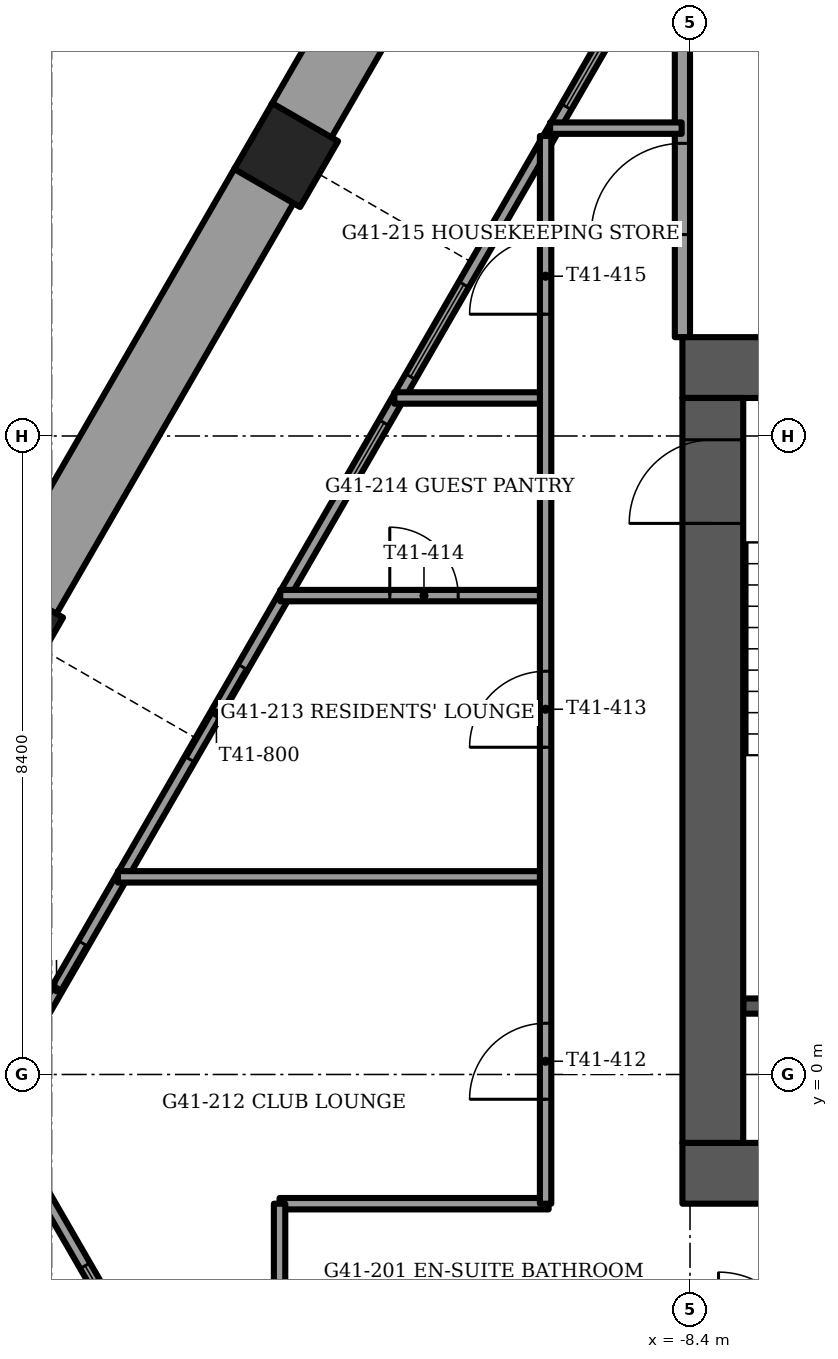
"""IFC4 building model, lengths in metres.
Left out: names, types, materials, properties, quantities, classifications, styles, units other than length and angle.
Written with IfcOpenShell. Run it as: python <this file> out.ifc"""

import sys

from ifc_helpers import new_model, si_unit, direction, frame, frame_2d, origin, origin_2d, place, context, subcontext, project, spatial, rectangle, extrude, element, fill, save


model = new_model("IFC4")
c1 = context("Model", 3, precision=1e-05, world=origin(), true_north=direction((0.0, 1.0)))
c2 = subcontext(c1, "Body", "Model", "MODEL_VIEW")
j1 = project(units=[si_unit("LENGTHUNIT", "METRE"), si_unit("PLANEANGLEUNIT", "RADIAN")], contexts=[c1])
p1 = place(None, origin())
s1 = spatial("IfcSite", under=j1, at=p1, CompositionType="ELEMENT")
p2 = place(p1, origin())
s2 = spatial("IfcBuilding", under=s1, at=p2, CompositionType="ELEMENT")
p3 = place(p2, frame((0.0, 0.0, 168.25)))
s3 = spatial("IfcBuildingStorey", under=s2, at=p3, CompositionType="ELEMENT", Elevation=168.25)
for number, where, z_axis, x_axis in (
    (1, (-13.713, 12.095, -1.2), (0.0, 0.0, 1.0), (0.5, 0.866, 0.0)),
    (2, (-17.331, 5.829, -1.2), (0.0, 0.0, 1.0), (0.5, 0.866, 0.0)),
):
    element("IfcColumn", number, at=place(p3, frame(where, z_axis=z_axis, x_axis=x_axis)), inside=s3, PredefinedType="COLUMN", context=c2, shape_type="SweptSolid", body=[
        extrude(rectangle(XDim=1.0, YDim=1.0, at=origin_2d()), origin(), (0.0, 0.0, 1.0), 3.75),
    ])
p4 = place(p3, frame((-8.5, -1.3, -0.3), z_axis=(0.0, 0.0, 1.0), x_axis=(1.0, 0.0, 0.0)))
e3 = element("IfcWall", 3, at=p4, inside=s3, PredefinedType="SHEAR", context=c2, shape_type="SweptSolid", body=[
    extrude(rectangle(XDim=17.0, YDim=0.8, at=frame_2d((8.5, 0.0))), origin(), (0.0, 0.0, 1.0), 3.75),
])
p5 = place(p4, frame((7.7, 0.0, 0.0)))
e4 = element("IfcOpeningElement", 4, at=p5, cuts=e3, PredefinedType="OPENING", context=c2, shape_type="SweptSolid", body=[
    extrude(rectangle(XDim=1.6, YDim=2.1, at=frame_2d((0.8, 1.05))), frame((0.0, 0.4, 0.0), z_axis=(0.0, -1.0, 0.0), x_axis=(1.0, 0.0, 0.0)), (0.0, 0.0, 1.0), 0.8),
])
p6 = place(p3, frame((-8.5, 9.3, -0.3), z_axis=(0.0, 0.0, 1.0), x_axis=(1.0, 0.0, 0.0)))
e5 = element("IfcWall", 5, at=p6, inside=s3, PredefinedType="SHEAR", context=c2, shape_type="SweptSolid", body=[
    extrude(rectangle(XDim=17.0, YDim=0.8, at=frame_2d((8.5, 0.0))), origin(), (0.0, 0.0, 1.0), 3.75),
])
p7 = place(p6, frame((7.7, 0.0, 0.0)))
e6 = element("IfcOpeningElement", 6, at=p7, cuts=e5, PredefinedType="OPENING", context=c2, shape_type="SweptSolid", body=[
    extrude(rectangle(XDim=1.6, YDim=2.1, at=frame_2d((0.8, 1.05))), frame((0.0, 0.4, 0.0), z_axis=(0.0, -1.0, 0.0), x_axis=(1.0, 0.0, 0.0)), (0.0, 0.0, 1.0), 0.8),
])
p8 = place(p6, frame((1.75, 0.0, 0.0)))
e7 = element("IfcOpeningElement", 7, at=p8, cuts=e5, PredefinedType="OPENING", context=c2, shape_type="SweptSolid", body=[
    extrude(rectangle(XDim=1.1, YDim=2.1, at=frame_2d((0.55, 1.05))), frame((0.0, 0.4, 0.0), z_axis=(0.0, -1.0, 0.0), x_axis=(1.0, 0.0, 0.0)), (0.0, 0.0, 1.0), 0.8),
])
p9 = place(p6, frame((14.15, 0.0, 0.0)))
e8 = element("IfcOpeningElement", 8, at=p9, cuts=e5, PredefinedType="OPENING", context=c2, shape_type="SweptSolid", body=[
    extrude(rectangle(XDim=1.1, YDim=2.1, at=frame_2d((0.55, 1.05))), frame((0.0, 0.4, 0.0), z_axis=(0.0, -1.0, 0.0), x_axis=(1.0, 0.0, 0.0)), (0.0, 0.0, 1.0), 0.8),
])
p10 = place(p3, frame((-8.1, -0.9, -0.3), z_axis=(0.0, 0.0, 1.0), x_axis=(0.0, 1.0, 0.0)))
e9 = element("IfcWall", 9, at=p10, inside=s3, PredefinedType="SHEAR", context=c2, shape_type="SweptSolid", body=[
    extrude(rectangle(XDim=9.8, YDim=0.8, at=frame_2d((4.9, 0.0))), origin(), (0.0, 0.0, 1.0), 3.75),
])
p11 = place(p10, frame((8.15, 0.0, 0.0)))
e10 = element("IfcOpeningElement", 10, at=p11, cuts=e9, PredefinedType="OPENING", context=c2, shape_type="SweptSolid", body=[
    extrude(rectangle(XDim=1.1, YDim=2.1, at=frame_2d((0.55, 1.05))), frame((0.0, 0.4, 0.0), z_axis=(0.0, -1.0, 0.0), x_axis=(1.0, 0.0, 0.0)), (0.0, 0.0, 1.0), 0.8),
])
p12 = place(p3, frame((-10.431, 17.88, 0.0), z_axis=(0.0, 0.0, 1.0), x_axis=(-0.49998343065, -0.866034969892, 0.0)))
e11 = element("IfcWall", 11, at=p12, inside=s3, PredefinedType="PARAPET", context=c2, shape_type="SweptSolid", body=[
    extrude(rectangle(XDim=6.181, YDim=0.9, at=frame_2d((3.091, 0.0))), origin(), (0.0, 0.0, 1.0), 1.1),
])
p13 = place(p3, frame((-13.992, 11.713, 0.0), z_axis=(0.0, 0.0, 1.0), x_axis=(-0.499984268907, -0.866034485945, 0.0)))
e12 = element("IfcWall", 12, at=p13, inside=s3, PredefinedType="PARAPET", context=c2, shape_type="SweptSolid", body=[
    extrude(rectangle(XDim=6.296, YDim=0.9, at=frame_2d((3.148, 0.0))), origin(), (0.0, 0.0, 1.0), 1.1),
])
p14 = place(p3, frame((-7.393, 17.292, 0.0), z_axis=(0.0, 0.0, 1.0), x_axis=(-0.500001917853, -0.866024296509, 0.0)))
e13 = element("IfcWall", 13, at=p14, inside=s3, PredefinedType="SOLIDWALL", context=c2, shape_type="SweptSolid", body=[
    extrude(rectangle(XDim=19.788, YDim=0.15, at=frame_2d((9.894, 0.0))), origin(), (0.0, 0.0, 1.0), 3.45),
])
p15 = place(p14, frame((3.868, 0.0, 0.15)))
e14 = element("IfcOpeningElement", 14, at=p15, cuts=e13, PredefinedType="OPENING", context=c2, shape_type="SweptSolid", body=[
    extrude(rectangle(XDim=1.4, YDim=2.85, at=frame_2d((0.7, 1.425))), frame((0.0, 0.075, 0.0), z_axis=(0.0, -1.0, 0.0), x_axis=(1.0, 0.0, 0.0)), (0.0, 0.0, 1.0), 0.15),
])
p16 = place(p14, frame((10.067, 0.0, 0.15)))
e15 = element("IfcOpeningElement", 15, at=p16, cuts=e13, PredefinedType="OPENING", context=c2, shape_type="SweptSolid", body=[
    extrude(rectangle(XDim=0.9, YDim=2.85, at=frame_2d((0.45, 1.425))), frame((0.0, 0.075, 0.0), z_axis=(0.0, -1.0, 0.0), x_axis=(1.0, 0.0, 0.0)), (0.0, 0.0, 1.0), 0.15),
])
p17 = place(p14, frame((7.967, 0.0, 0.15)))
e16 = element("IfcOpeningElement", 16, at=p17, cuts=e13, PredefinedType="OPENING", context=c2, shape_type="SweptSolid", body=[
    extrude(rectangle(XDim=1.4, YDim=2.85, at=frame_2d((0.7, 1.425))), frame((0.0, 0.075, 0.0), z_axis=(0.0, -1.0, 0.0), x_axis=(1.0, 0.0, 0.0)), (0.0, 0.0, 1.0), 0.15),
])
p18 = place(p14, frame((13.779, 0.0, 0.0)))
e17 = element("IfcOpeningElement", 17, at=p18, cuts=e13, PredefinedType="OPENING", context=c2, shape_type="SweptSolid", body=[
    extrude(rectangle(XDim=1.4, YDim=2.4, at=frame_2d((0.7, 1.2))), frame((0.0, 0.075, 0.0), z_axis=(0.0, -1.0, 0.0), x_axis=(1.0, 0.0, 0.0)), (0.0, 0.0, 1.0), 0.15),
])
p19 = place(p14, frame((17.979, 0.0, 0.0)))
e18 = element("IfcOpeningElement", 18, at=p19, cuts=e13, PredefinedType="OPENING", context=c2, shape_type="SweptSolid", body=[
    extrude(rectangle(XDim=1.4, YDim=2.4, at=frame_2d((0.7, 1.2))), frame((0.0, 0.075, 0.0), z_axis=(0.0, -1.0, 0.0), x_axis=(1.0, 0.0, 0.0)), (0.0, 0.0, 1.0), 0.15),
])
p20 = place(p14, frame((0.168, 0.0, 0.15)))
e19 = element("IfcOpeningElement", 19, at=p20, cuts=e13, PredefinedType="OPENING", context=c2, shape_type="SweptSolid", body=[
    extrude(rectangle(XDim=1.6, YDim=2.73, at=frame_2d((0.8, 1.365))), frame((0.0, 0.075, 0.0), z_axis=(0.0, -1.0, 0.0), x_axis=(1.0, 0.0, 0.0)), (0.0, 0.0, 1.0), 0.15),
])
p21 = place(p3, frame((-17.287, -0.909, 0.0), z_axis=(0.0, 0.0, 1.0), x_axis=(0.500004460396, -0.866022828558, 0.0)))
e20 = element("IfcWall", 20, at=p21, inside=s3, PredefinedType="SOLIDWALL", context=c2, shape_type="SweptSolid", body=[
    extrude(rectangle(XDim=15.712, YDim=0.15, at=frame_2d((7.856, 0.0))), origin(), (0.0, 0.0, 1.0), 3.45),
])
p22 = place(p21, frame((1.856, 0.0, 0.15)))
e21 = element("IfcOpeningElement", 21, at=p22, cuts=e20, PredefinedType="OPENING", context=c2, shape_type="SweptSolid", body=[
    extrude(rectangle(XDim=0.9, YDim=2.85, at=frame_2d((0.45, 1.425))), frame((0.0, 0.075, 0.0), z_axis=(0.0, -1.0, 0.0), x_axis=(1.0, 0.0, 0.0)), (0.0, 0.0, 1.0), 0.15),
])
p23 = place(p21, frame((4.056, 0.0, 0.15)))
e22 = element("IfcOpeningElement", 22, at=p23, cuts=e20, PredefinedType="OPENING", context=c2, shape_type="SweptSolid", body=[
    extrude(rectangle(XDim=1.4, YDim=2.85, at=frame_2d((0.7, 1.425))), frame((0.0, 0.075, 0.0), z_axis=(0.0, -1.0, 0.0), x_axis=(1.0, 0.0, 0.0)), (0.0, 0.0, 1.0), 0.15),
])
p24 = place(p21, frame((6.549, 0.0, 0.15)))
e23 = element("IfcOpeningElement", 23, at=p24, cuts=e20, PredefinedType="OPENING", context=c2, shape_type="SweptSolid", body=[
    extrude(rectangle(XDim=1.6, YDim=2.85, at=frame_2d((0.8, 1.425))), frame((0.0, 0.075, 0.0), z_axis=(0.0, -1.0, 0.0), x_axis=(1.0, 0.0, 0.0)), (0.0, 0.0, 1.0), 0.15),
])
p25 = place(p21, frame((8.256, 0.0, 0.0)))
e24 = element("IfcOpeningElement", 24, at=p25, cuts=e20, PredefinedType="OPENING", context=c2, shape_type="SweptSolid", body=[
    extrude(rectangle(XDim=1.4, YDim=2.4, at=frame_2d((0.7, 1.2))), frame((0.0, 0.075, 0.0), z_axis=(0.0, -1.0, 0.0), x_axis=(1.0, 0.0, 0.0)), (0.0, 0.0, 1.0), 0.15),
])
p26 = place(p21, frame((10.256, 0.0, 0.15)))
e25 = element("IfcOpeningElement", 25, at=p26, cuts=e20, PredefinedType="OPENING", context=c2, shape_type="SweptSolid", body=[
    extrude(rectangle(XDim=0.9, YDim=2.85, at=frame_2d((0.45, 1.425))), frame((0.0, 0.075, 0.0), z_axis=(0.0, -1.0, 0.0), x_axis=(1.0, 0.0, 0.0)), (0.0, 0.0, 1.0), 0.15),
])
p27 = place(p3, frame((-7.7, 0.9, -0.3), z_axis=(0.0, 0.0, 1.0), x_axis=(1.0, 0.0, 0.0)))
e26 = element("IfcWall", 26, at=p27, inside=s3, PredefinedType="SOLIDWALL", context=c2, shape_type="SweptSolid", body=[
    extrude(rectangle(XDim=3.25, YDim=0.2, at=frame_2d((1.625, 0.0))), origin(), (0.0, 0.0, 1.0), 3.75),
])
p28 = place(p3, frame((-8.5, 9.7, 0.0), z_axis=(0.0, 0.0, 1.0), x_axis=(0.0, 1.0, 0.0)))
e27 = element("IfcWall", 27, at=p28, inside=s3, PredefinedType="PARTITIONING", context=c2, shape_type="SweptSolid", body=[
    extrude(rectangle(XDim=3.9, YDim=0.2, at=frame_2d((1.95, 0.0))), origin(), (0.0, 0.0, 1.0), 3.45),
])
p29 = place(p28, frame((1.35, 0.0, 0.0)))
e28 = element("IfcOpeningElement", 28, at=p29, cuts=e27, PredefinedType="OPENING", context=c2, shape_type="SweptSolid", body=[
    extrude(rectangle(XDim=1.2, YDim=2.1, at=frame_2d((0.6, 1.05))), frame((0.0, 0.1, 0.0), z_axis=(0.0, -1.0, 0.0), x_axis=(1.0, 0.0, 0.0)), (0.0, 0.0, 1.0), 0.2),
])
p30 = place(p3, frame((-13.8, -1.7, 0.0), z_axis=(0.0, 0.0, 1.0), x_axis=(1.0, 0.0, 0.0)))
e29 = element("IfcWall", 29, at=p30, inside=s3, PredefinedType="PARTITIONING", context=c2, shape_type="SweptSolid", body=[
    extrude(rectangle(XDim=3.54, YDim=0.15, at=frame_2d((1.77, 0.0))), origin(), (0.0, 0.0, 1.0), 3.45),
])
p31 = place(p3, frame((-15.927, 2.6, 0.0), z_axis=(0.0, 0.0, 1.0), x_axis=(1.0, 0.0, 0.0)))
e30 = element("IfcWall", 30, at=p31, inside=s3, PredefinedType="PARTITIONING", context=c2, shape_type="SweptSolid", body=[
    extrude(rectangle(XDim=5.627, YDim=0.15, at=frame_2d((2.813, 0.0))), origin(), (0.0, 0.0, 1.0), 3.45),
])
p32 = place(p3, frame((-13.791, 6.3, 0.0), z_axis=(0.0, 0.0, 1.0), x_axis=(1.0, 0.0, 0.0)))
e31 = element("IfcWall", 31, at=p32, inside=s3, PredefinedType="PARTITIONING", context=c2, shape_type="SweptSolid", body=[
    extrude(rectangle(XDim=3.491, YDim=0.15, at=frame_2d((1.746, 0.0))), origin(), (0.0, 0.0, 1.0), 3.45),
])
p33 = place(p32, frame((1.441, 0.0, 0.0)))
e32 = element("IfcOpeningElement", 32, at=p33, cuts=e31, PredefinedType="OPENING", context=c2, shape_type="SweptSolid", body=[
    extrude(rectangle(XDim=0.9, YDim=2.1, at=frame_2d((0.45, 1.05))), frame((0.0, 0.075, 0.0), z_axis=(0.0, -1.0, 0.0), x_axis=(1.0, 0.0, 0.0)), (0.0, 0.0, 1.0), 0.15),
])
p34 = place(p3, frame((-12.29, 8.9, 0.0), z_axis=(0.0, 0.0, 1.0), x_axis=(1.0, 0.0, 0.0)))
e33 = element("IfcWall", 33, at=p34, inside=s3, PredefinedType="PARTITIONING", context=c2, shape_type="SweptSolid", body=[
    extrude(rectangle(XDim=1.99, YDim=0.15, at=frame_2d((0.995, 0.0))), origin(), (0.0, 0.0, 1.0), 3.45),
])
p35 = place(p3, frame((-10.241, 12.45, 0.0), z_axis=(0.0, 0.0, 1.0), x_axis=(1.0, 0.0, 0.0)))
e34 = element("IfcWall", 34, at=p35, inside=s3, PredefinedType="PARTITIONING", context=c2, shape_type="SweptSolid", body=[
    extrude(rectangle(XDim=1.731, YDim=0.15, at=frame_2d((0.865, 0.0))), origin(), (0.0, 0.0, 1.0), 3.45),
])
p36 = place(p3, frame((-10.3, -1.7, 0.0), z_axis=(0.0, 0.0, 1.0), x_axis=(0.0, 1.0, 0.0)))
e35 = element("IfcWall", 35, at=p36, inside=s3, PredefinedType="PARTITIONING", context=c2, shape_type="SweptSolid", body=[
    extrude(rectangle(XDim=14.047, YDim=0.15, at=frame_2d((7.023, 0.0))), origin(), (0.0, 0.0, 1.0), 3.45),
])
p37 = place(p36, frame((1.374, 0.0, 0.0)))
e36 = element("IfcOpeningElement", 36, at=p37, cuts=e35, PredefinedType="OPENING", context=c2, shape_type="SweptSolid", body=[
    extrude(rectangle(XDim=1.0, YDim=2.1, at=frame_2d((0.5, 1.05))), frame((0.0, 0.075, 0.0), z_axis=(0.0, -1.0, 0.0), x_axis=(1.0, 0.0, 0.0)), (0.0, 0.0, 1.0), 0.15),
])
p38 = place(p36, frame((6.005, 0.0, 0.0)))
e37 = element("IfcOpeningElement", 37, at=p38, cuts=e35, PredefinedType="OPENING", context=c2, shape_type="SweptSolid", body=[
    extrude(rectangle(XDim=1.0, YDim=2.1, at=frame_2d((0.5, 1.05))), frame((0.0, 0.075, 0.0), z_axis=(0.0, -1.0, 0.0), x_axis=(1.0, 0.0, 0.0)), (0.0, 0.0, 1.0), 0.15),
])
p39 = place(p36, frame((11.702, 0.0, 0.0)))
e38 = element("IfcOpeningElement", 38, at=p39, cuts=e35, PredefinedType="OPENING", context=c2, shape_type="SweptSolid", body=[
    extrude(rectangle(XDim=1.0, YDim=2.1, at=frame_2d((0.5, 1.05))), frame((0.0, 0.075, 0.0), z_axis=(0.0, -1.0, 0.0), x_axis=(1.0, 0.0, 0.0)), (0.0, 0.0, 1.0), 0.15),
])
p40 = place(p3, frame((-13.8, -3.7, 0.0), z_axis=(0.0, 0.0, 1.0), x_axis=(0.0, 1.0, 0.0)))
e39 = element("IfcWall", 39, at=p40, inside=s3, PredefinedType="PARTITIONING", context=c2, shape_type="SweptSolid", body=[
    extrude(rectangle(XDim=2.0, YDim=0.15, at=frame_2d((1.0, 0.0))), origin(), (0.0, 0.0, 1.0), 3.45),
])
p41 = place(p15, origin())
e40 = element("IfcWindow", 40, at=p41, inside=s3, PartitioningType="SINGLE_PANEL", PredefinedType="WINDOW", context=c2, shape_type="SweptSolid", body=[
    extrude(rectangle(XDim=1.4, YDim=2.85, at=frame_2d((0.7, 1.425))), frame((0.0, 0.03, 0.0), z_axis=(0.0, -1.0, 0.0), x_axis=(1.0, 0.0, 0.0)), (0.0, 0.0, 1.0), 0.06),
])
fill(e14, e40)
p42 = place(p16, origin())
e41 = element("IfcWindow", 41, at=p42, inside=s3, PartitioningType="SINGLE_PANEL", PredefinedType="WINDOW", context=c2, shape_type="SweptSolid", body=[
    extrude(rectangle(XDim=0.9, YDim=2.85, at=frame_2d((0.45, 1.425))), frame((0.0, 0.03, 0.0), z_axis=(0.0, -1.0, 0.0), x_axis=(1.0, 0.0, 0.0)), (0.0, 0.0, 1.0), 0.06),
])
fill(e15, e41)
p43 = place(p17, origin())
e42 = element("IfcWindow", 42, at=p43, inside=s3, PartitioningType="SINGLE_PANEL", PredefinedType="WINDOW", context=c2, shape_type="SweptSolid", body=[
    extrude(rectangle(XDim=1.4, YDim=2.85, at=frame_2d((0.7, 1.425))), frame((0.0, 0.03, 0.0), z_axis=(0.0, -1.0, 0.0), x_axis=(1.0, 0.0, 0.0)), (0.0, 0.0, 1.0), 0.06),
])
fill(e16, e42)
p44 = place(p18, origin())
e43 = element("IfcDoor", 43, at=p44, inside=s3, OperationType="SLIDING_TO_LEFT", PredefinedType="DOOR", context=c2, shape_type="SweptSolid", body=[
    extrude(rectangle(XDim=1.4, YDim=2.4, at=frame_2d((0.7, 1.2))), frame((0.0, 0.025, 0.0), z_axis=(0.0, -1.0, 0.0), x_axis=(1.0, 0.0, 0.0)), (0.0, 0.0, 1.0), 0.05),
])
fill(e17, e43)
p45 = place(p19, origin())
e44 = element("IfcDoor", 44, at=p45, inside=s3, OperationType="SLIDING_TO_RIGHT", PredefinedType="DOOR", context=c2, shape_type="SweptSolid", body=[
    extrude(rectangle(XDim=1.4, YDim=2.4, at=frame_2d((0.7, 1.2))), frame((0.0, 0.025, 0.0), z_axis=(0.0, -1.0, 0.0), x_axis=(1.0, 0.0, 0.0)), (0.0, 0.0, 1.0), 0.05),
])
fill(e18, e44)
p46 = place(p22, origin())
e45 = element("IfcWindow", 45, at=p46, inside=s3, PartitioningType="SINGLE_PANEL", PredefinedType="WINDOW", context=c2, shape_type="SweptSolid", body=[
    extrude(rectangle(XDim=0.9, YDim=2.85, at=frame_2d((0.45, 1.425))), frame((0.0, 0.03, 0.0), z_axis=(0.0, -1.0, 0.0), x_axis=(1.0, 0.0, 0.0)), (0.0, 0.0, 1.0), 0.06),
])
fill(e21, e45)
p47 = place(p11, origin())
e46 = element("IfcDoor", 46, at=p47, inside=s3, OperationType="SINGLE_SWING_RIGHT", PredefinedType="DOOR", context=c2, shape_type="SweptSolid", body=[
    extrude(rectangle(XDim=1.1, YDim=2.1, at=frame_2d((0.55, 1.05))), frame((0.0, 0.025, 0.0), z_axis=(0.0, -1.0, 0.0), x_axis=(1.0, 0.0, 0.0)), (0.0, 0.0, 1.0), 0.05),
])
fill(e10, e46)
p48 = place(p29, origin())
e47 = element("IfcDoor", 47, at=p48, inside=s3, OperationType="SINGLE_SWING_LEFT", PredefinedType="DOOR", context=c2, shape_type="SweptSolid", body=[
    extrude(rectangle(XDim=1.2, YDim=2.1, at=frame_2d((0.6, 1.05))), frame((0.0, 0.025, 0.0), z_axis=(0.0, -1.0, 0.0), x_axis=(1.0, 0.0, 0.0)), (0.0, 0.0, 1.0), 0.05),
])
fill(e28, e47)
p49 = place(p37, origin())
e48 = element("IfcDoor", 48, at=p49, inside=s3, OperationType="SINGLE_SWING_LEFT", PredefinedType="DOOR", context=c2, shape_type="SweptSolid", body=[
    extrude(rectangle(XDim=1.0, YDim=2.1, at=frame_2d((0.5, 1.05))), frame((0.0, 0.025, 0.0), z_axis=(0.0, -1.0, 0.0), x_axis=(1.0, 0.0, 0.0)), (0.0, 0.0, 1.0), 0.05),
])
fill(e36, e48)
p50 = place(p38, origin())
e49 = element("IfcDoor", 49, at=p50, inside=s3, OperationType="SINGLE_SWING_LEFT", PredefinedType="DOOR", context=c2, shape_type="SweptSolid", body=[
    extrude(rectangle(XDim=1.0, YDim=2.1, at=frame_2d((0.5, 1.05))), frame((0.0, 0.025, 0.0), z_axis=(0.0, -1.0, 0.0), x_axis=(1.0, 0.0, 0.0)), (0.0, 0.0, 1.0), 0.05),
])
fill(e37, e49)
p51 = place(p33, origin())
e50 = element("IfcDoor", 50, at=p51, inside=s3, OperationType="SINGLE_SWING_RIGHT", PredefinedType="DOOR", context=c2, shape_type="SweptSolid", body=[
    extrude(rectangle(XDim=0.9, YDim=2.1, at=frame_2d((0.45, 1.05))), frame((0.0, 0.025, 0.0), z_axis=(0.0, -1.0, 0.0), x_axis=(1.0, 0.0, 0.0)), (0.0, 0.0, 1.0), 0.05),
])
fill(e32, e50)
p52 = place(p39, origin())
e51 = element("IfcDoor", 51, at=p52, inside=s3, OperationType="SINGLE_SWING_LEFT", PredefinedType="DOOR", context=c2, shape_type="SweptSolid", body=[
    extrude(rectangle(XDim=1.0, YDim=2.1, at=frame_2d((0.5, 1.05))), frame((0.0, 0.025, 0.0), z_axis=(0.0, -1.0, 0.0), x_axis=(1.0, 0.0, 0.0)), (0.0, 0.0, 1.0), 0.05),
])
fill(e38, e51)
save(model, sys.argv[1])
